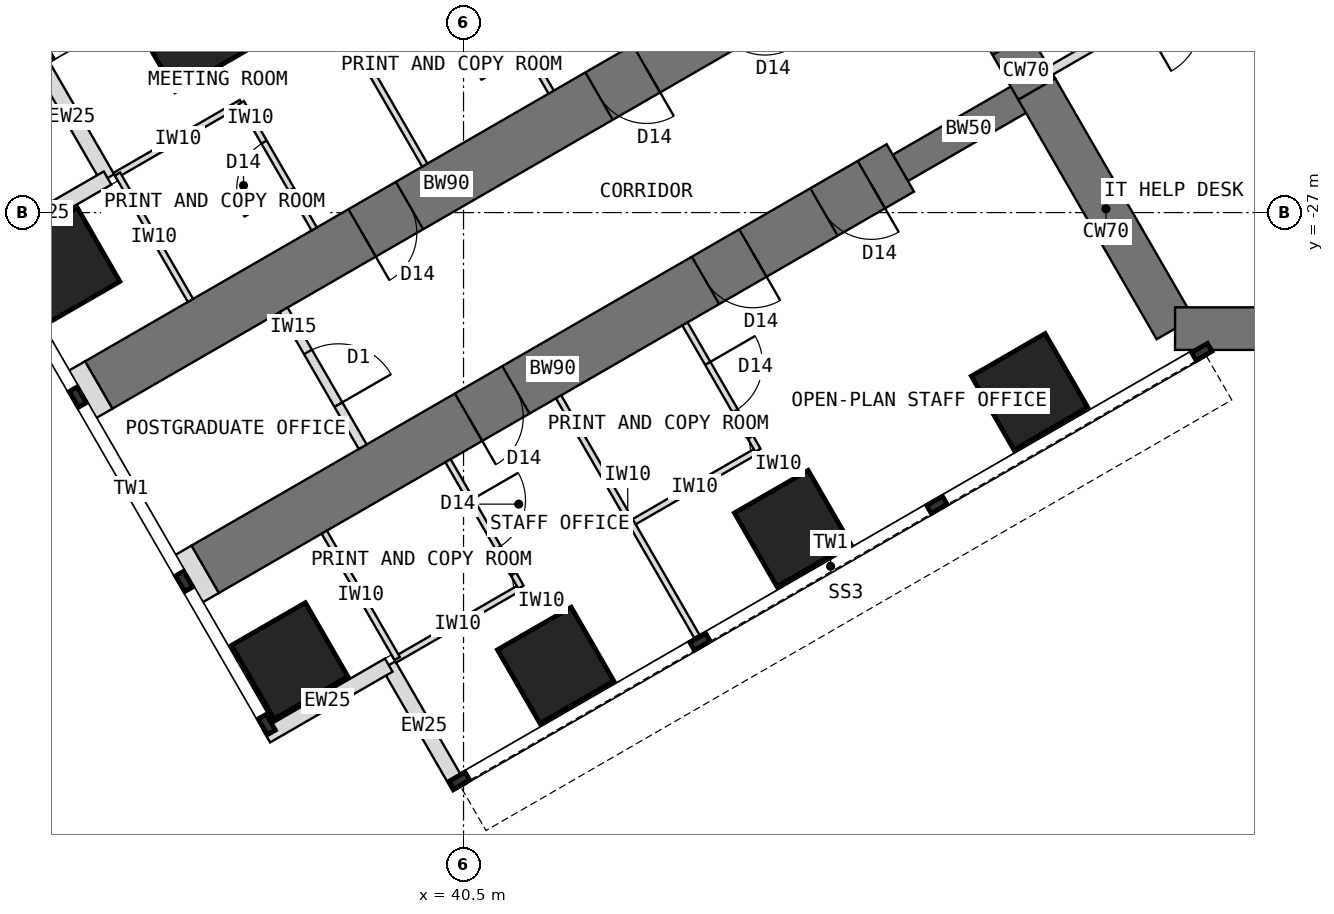
"""IFC4 building model, lengths in metres.
Left out: names, types, materials, properties, quantities, classifications, styles, units other than length and angle.
Written with IfcOpenShell. Run it as: python <this file> out.ifc"""

import sys

from ifc_helpers import new_model, si_unit, direction, frame, frame_2d, origin, origin_2d, place, context, subcontext, project, spatial, rectangle, extrude, element, fill, save


model = new_model("IFC4")
c1 = context("Model", 3, precision=1e-05, world=origin(), true_north=direction((0.0, 1.0)))
c2 = subcontext(c1, "Body", "Model", "MODEL_VIEW")
j1 = project(units=[si_unit("LENGTHUNIT", "METRE"), si_unit("PLANEANGLEUNIT", "RADIAN")], contexts=[c1])
p1 = place(None, origin())
s1 = spatial("IfcSite", under=j1, at=p1, CompositionType="ELEMENT")
p2 = place(p1, origin())
s2 = spatial("IfcBuilding", under=s1, at=p2, CompositionType="ELEMENT")
p3 = place(p2, frame((0.0, 0.0, 72.5)))
s3 = spatial("IfcBuildingStorey", under=s2, at=p3, CompositionType="ELEMENT", Elevation=72.5)
p4 = place(p3, frame((48.178, -21.939, 0.0), z_axis=(0.0, 0.0, 1.0), x_axis=(0.500010275428, -0.866019471182, 0.0)))
e1 = element("IfcWall", 1, at=p4, inside=s3, PredefinedType="SHEAR", context=c2, shape_type="SweptSolid", body=[
    extrude(rectangle(XDim=3.5, YDim=0.7, at=frame_2d((1.75, 0.0))), origin(), (0.0, 0.0, 1.0), 4.0),
])
p5 = place(p4, frame((0.85, 0.0, 0.0)))
e2 = element("IfcOpeningElement", 2, at=p5, cuts=e1, PredefinedType="OPENING", context=c2, shape_type="SweptSolid", body=[
    extrude(rectangle(XDim=1.8, YDim=2.1, at=frame_2d((0.9, 1.05))), frame((0.0, 0.36, 0.0), z_axis=(0.0, -1.0, 0.0), x_axis=(1.0, 0.0, 0.0)), (0.0, 0.0, 1.0), 0.72),
])
p6 = place(p3, frame((49.928, -24.97, 0.0), z_axis=(0.0, 0.0, 1.0), x_axis=(0.499984222037, -0.866034513004, 0.0)))
e3 = element("IfcWall", 3, at=p6, inside=s3, PredefinedType="SHEAR", context=c2, shape_type="SweptSolid", body=[
    extrude(rectangle(XDim=4.548, YDim=0.7, at=frame_2d((2.274, 0.0))), origin(), (0.0, 0.0, 1.0), 4.0),
])
p7 = place(p3, frame((52.202, -28.908, 0.0), z_axis=(0.0, 0.0, 1.0), x_axis=(1.0, 0.0, 0.0)))
e4 = element("IfcWall", 4, at=p7, inside=s3, PredefinedType="SHEAR", context=c2, shape_type="SweptSolid", body=[
    extrude(rectangle(XDim=12.596, YDim=0.7, at=frame_2d((6.298, 0.0))), origin(), (0.0, 0.0, 1.0), 4.0),
])
p8 = place(p3, frame((49.928, -24.97, 0.0), z_axis=(0.0, 0.0, 1.0), x_axis=(-0.866031863473, -0.499988811324, 0.0)))
e5 = element("IfcWall", 5, at=p8, inside=s3, PredefinedType="SHEAR", context=c2, shape_type="SweptSolid", body=[
    extrude(rectangle(XDim=2.592, YDim=0.5, at=frame_2d((1.296, 0.0))), origin(), (0.0, 0.0, 1.0), 4.0),
])
p9 = place(p3, frame((47.684, -26.266, 0.0), z_axis=(0.0, 0.0, 1.0), x_axis=(-0.866027579429, -0.499996231654, 0.0)))
e6 = element("IfcWall", 6, at=p9, inside=s3, PredefinedType="SHEAR", context=c2, shape_type="SweptSolid", body=[
    extrude(rectangle(XDim=13.2, YDim=0.9, at=frame_2d((6.6, 0.0))), origin(), (0.0, 0.0, 1.0), 4.0),
])
p10 = place(p9, frame((0.55, 0.0, 0.0)))
e7 = element("IfcOpeningElement", 7, at=p10, cuts=e6, PredefinedType="OPENING", context=c2, shape_type="SweptSolid", body=[
    extrude(rectangle(XDim=0.9, YDim=2.1, at=frame_2d((0.45, 1.05))), frame((0.0, 0.46, 0.0), z_axis=(0.0, -1.0, 0.0), x_axis=(1.0, 0.0, 0.0)), (0.0, 0.0, 1.0), 0.92),
])
p11 = place(p9, frame((2.8, 0.0, 0.0)))
e8 = element("IfcOpeningElement", 8, at=p11, cuts=e6, PredefinedType="OPENING", context=c2, shape_type="SweptSolid", body=[
    extrude(rectangle(XDim=0.9, YDim=2.1, at=frame_2d((0.45, 1.05))), frame((0.0, 0.46, 0.0), z_axis=(0.0, -1.0, 0.0), x_axis=(1.0, 0.0, 0.0)), (0.0, 0.0, 1.0), 0.92),
])
p12 = place(p9, frame((7.3, 0.0, 0.0)))
e9 = element("IfcOpeningElement", 9, at=p12, cuts=e6, PredefinedType="OPENING", context=c2, shape_type="SweptSolid", body=[
    extrude(rectangle(XDim=0.9, YDim=2.1, at=frame_2d((0.45, 1.05))), frame((0.0, 0.46, 0.0), z_axis=(0.0, -1.0, 0.0), x_axis=(1.0, 0.0, 0.0)), (0.0, 0.0, 1.0), 0.92),
])
p13 = place(p3, frame((45.934, -23.234, 0.0), z_axis=(0.0, 0.0, 1.0), x_axis=(-0.866019570528, -0.500010103361, 0.0)))
e10 = element("IfcWall", 10, at=p13, inside=s3, PredefinedType="SHEAR", context=c2, shape_type="SweptSolid", body=[
    extrude(rectangle(XDim=13.2, YDim=0.9, at=frame_2d((6.6, 0.0))), origin(), (0.0, 0.0, 1.0), 4.0),
])
p14 = place(p13, frame((0.55, 0.0, 0.0)))
e11 = element("IfcOpeningElement", 11, at=p14, cuts=e10, PredefinedType="OPENING", context=c2, shape_type="SweptSolid", body=[
    extrude(rectangle(XDim=0.9, YDim=2.1, at=frame_2d((0.45, 1.05))), frame((0.0, 0.46, 0.0), z_axis=(0.0, -1.0, 0.0), x_axis=(1.0, 0.0, 0.0)), (0.0, 0.0, 1.0), 0.92),
])
p15 = place(p13, frame((2.8, 0.0, 0.0)))
e12 = element("IfcOpeningElement", 12, at=p15, cuts=e10, PredefinedType="OPENING", context=c2, shape_type="SweptSolid", body=[
    extrude(rectangle(XDim=0.9, YDim=2.1, at=frame_2d((0.45, 1.05))), frame((0.0, 0.46, 0.0), z_axis=(0.0, -1.0, 0.0), x_axis=(1.0, 0.0, 0.0)), (0.0, 0.0, 1.0), 0.92),
])
p16 = place(p13, frame((7.3, 0.0, 0.0)))
e13 = element("IfcOpeningElement", 13, at=p16, cuts=e10, PredefinedType="OPENING", context=c2, shape_type="SweptSolid", body=[
    extrude(rectangle(XDim=0.9, YDim=2.1, at=frame_2d((0.45, 1.05))), frame((0.0, 0.46, 0.0), z_axis=(0.0, -1.0, 0.0), x_axis=(1.0, 0.0, 0.0)), (0.0, 0.0, 1.0), 0.92),
])
for number, where, z_axis, x_axis in (
    (14, (49.809, -29.946, 0.0), (0.0, 0.0, 1.0), (0.866, 0.5, 0.0)),
    (15, (45.912, -32.196, 0.0), (0.0, 0.0, 1.0), (0.866, 0.5, 0.0)),
    (16, (42.014, -34.446, 0.0), (0.0, 0.0, 1.0), (0.866, 0.5, 0.0)),
    (17, (36.014, -24.054, 0.0), (0.0, 0.0, 1.0), (0.866, 0.5, 0.0)),
    (18, (37.642, -34.373, 0.0), (0.0, 0.0, 1.0), (0.866, 0.5, 0.0)),
    (19, (33.892, -27.877, 0.0), (0.0, 0.0, 1.0), (0.866, 0.5, 0.0)),
):
    element("IfcColumn", number, at=place(p3, frame(where, z_axis=z_axis, x_axis=x_axis)), inside=s3, PredefinedType="COLUMN", context=c2, shape_type="SweptSolid", body=[
        extrude(rectangle(XDim=1.4, YDim=1.4, at=origin_2d()), origin(), (0.0, 0.0, 1.0), 4.0),
    ])
for number, where, z_axis, x_axis in (
    (20, (40.433, -36.456, 0.0), (0.0, 0.0, 1.0), (-0.5, 0.866, 0.0)),
    (21, (39.27, -34.443, 0.0), (0.0, 0.0, 1.0), (-0.866, -0.5, 0.0)),
    (22, (33.483, -24.419, 0.0), (0.0, 0.0, 1.0), (0.5, -0.866, 0.0)),
    (23, (34.645, -26.432, 0.0), (0.0, 0.0, 1.0), (-0.866, -0.5, 0.0)),
):
    element("IfcWall", number, at=place(p3, frame(where, z_axis=z_axis, x_axis=x_axis)), inside=s3, PredefinedType="STANDARD", context=c2, shape_type="SweptSolid", body=[
        extrude(rectangle(XDim=2.325, YDim=0.25, at=frame_2d((1.163, 0.0))), origin(), (0.0, 0.0, 1.0), 3.8),
    ])
for number, where, z_axis, x_axis in (
    (24, (36.252, -32.865, 0.0), (0.0, 0.0, 1.0), (-0.866, -0.5, 0.0)),
    (25, (34.502, -29.834, 0.0), (0.0, 0.0, 1.0), (-0.866, -0.5, 0.0)),
):
    element("IfcWall", number, at=place(p3, frame(where, z_axis=z_axis, x_axis=x_axis)), inside=s3, PredefinedType="PARTITIONING", context=c2, shape_type="SweptSolid", body=[
        extrude(rectangle(XDim=0.31, YDim=0.9, at=frame_2d((0.155, 0.0))), origin(), (0.0, 0.0, 1.0), 3.8),
    ])
p17 = place(p3, frame((42.063, -30.03, 0.0), z_axis=(0.0, 0.0, 1.0), x_axis=(0.499982560684, -0.866035472144, 0.0)))
e26 = element("IfcWall", 26, at=p17, inside=s3, PredefinedType="PARTITIONING", context=c2, shape_type="SweptSolid", body=[
    extrude(rectangle(XDim=4.55, YDim=0.1, at=frame_2d((2.275, 0.0))), origin(), (0.0, 0.0, 1.0), 3.8),
])
p18 = place(p3, frame((45.342, -30.909, 0.0), z_axis=(0.0, 0.0, 1.0), x_axis=(-0.866050077142, -0.499957262057, 0.0)))
e27 = element("IfcWall", 27, at=p18, inside=s3, PredefinedType="PARTITIONING", context=c2, shape_type="SweptSolid", body=[
    extrude(rectangle(XDim=2.4, YDim=0.1, at=frame_2d((1.2, 0.0))), origin(), (0.0, 0.0, 1.0), 3.8),
])
p19 = place(p3, frame((44.141, -28.83, 0.0), z_axis=(0.0, 0.0, 1.0), x_axis=(0.500077600433, -0.865980596518, 0.0)))
e28 = element("IfcWall", 28, at=p19, inside=s3, PredefinedType="PARTITIONING", context=c2, shape_type="SweptSolid", body=[
    extrude(rectangle(XDim=2.4, YDim=0.1, at=frame_2d((1.2, 0.0))), origin(), (0.0, 0.0, 1.0), 3.8),
])
p20 = place(p19, frame((0.75, 0.0, 0.0)))
e29 = element("IfcOpeningElement", 29, at=p20, cuts=e28, PredefinedType="OPENING", context=c2, shape_type="SweptSolid", body=[
    extrude(rectangle(XDim=0.9, YDim=2.1, at=frame_2d((0.45, 1.05))), frame((0.0, 0.06, 0.0), z_axis=(0.0, -1.0, 0.0), x_axis=(1.0, 0.0, 0.0)), (0.0, 0.0, 1.0), 0.12),
])
p21 = place(p3, frame((41.444, -33.159, 0.0), z_axis=(0.0, 0.0, 1.0), x_axis=(-0.866024647952, -0.500001309137, 0.0)))
e30 = element("IfcWall", 30, at=p21, inside=s3, PredefinedType="PARTITIONING", context=c2, shape_type="SweptSolid", body=[
    extrude(rectangle(XDim=2.4, YDim=0.1, at=frame_2d((1.2, 0.0))), origin(), (0.0, 0.0, 1.0), 3.8),
])
p22 = place(p3, frame((40.244, -31.08, 0.0), z_axis=(0.0, 0.0, 1.0), x_axis=(0.500001309137, -0.866024647952, 0.0)))
e31 = element("IfcWall", 31, at=p22, inside=s3, PredefinedType="PARTITIONING", context=c2, shape_type="SweptSolid", body=[
    extrude(rectangle(XDim=2.4, YDim=0.1, at=frame_2d((1.2, 0.0))), origin(), (0.0, 0.0, 1.0), 3.8),
])
p23 = place(p22, frame((0.75, 0.0, 0.0)))
e32 = element("IfcOpeningElement", 32, at=p23, cuts=e31, PredefinedType="OPENING", context=c2, shape_type="SweptSolid", body=[
    extrude(rectangle(XDim=0.9, YDim=2.1, at=frame_2d((0.45, 1.05))), frame((0.0, 0.06, 0.0), z_axis=(0.0, -1.0, 0.0), x_axis=(1.0, 0.0, 0.0)), (0.0, 0.0, 1.0), 0.12),
])
p24 = place(p3, frame((38.209, -32.255, 0.0), z_axis=(0.0, 0.0, 1.0), x_axis=(0.500001309137, -0.866024647952, 0.0)))
e33 = element("IfcWall", 33, at=p24, inside=s3, PredefinedType="PARTITIONING", context=c2, shape_type="SweptSolid", body=[
    extrude(rectangle(XDim=2.4, YDim=0.1, at=frame_2d((1.2, 0.0))), origin(), (0.0, 0.0, 1.0), 3.8),
])
p25 = place(p3, frame((39.863, -26.22, 0.0), z_axis=(0.0, 0.0, 1.0), x_axis=(-0.500022803284, 0.866012237902, 0.0)))
e34 = element("IfcWall", 34, at=p25, inside=s3, PredefinedType="PARTITIONING", context=c2, shape_type="SweptSolid", body=[
    extrude(rectangle(XDim=4.55, YDim=0.1, at=frame_2d((2.275, 0.0))), origin(), (0.0, 0.0, 1.0), 3.8),
])
p26 = place(p3, frame((41.941, -25.02, 0.0), z_axis=(0.0, 0.0, 1.0), x_axis=(-0.499957262057, 0.866050077142, 0.0)))
e35 = element("IfcWall", 35, at=p26, inside=s3, PredefinedType="PARTITIONING", context=c2, shape_type="SweptSolid", body=[
    extrude(rectangle(XDim=2.4, YDim=0.1, at=frame_2d((1.2, 0.0))), origin(), (0.0, 0.0, 1.0), 3.8),
])
p27 = place(p26, frame((0.75, 0.0, 0.0)))
e36 = element("IfcOpeningElement", 36, at=p27, cuts=e35, PredefinedType="OPENING", context=c2, shape_type="SweptSolid", body=[
    extrude(rectangle(XDim=0.9, YDim=2.1, at=frame_2d((0.45, 1.05))), frame((0.0, 0.06, 0.0), z_axis=(0.0, -1.0, 0.0), x_axis=(1.0, 0.0, 0.0)), (0.0, 0.0, 1.0), 0.12),
])
p28 = place(p3, frame((36.844, -25.191, 0.0), z_axis=(0.0, 0.0, 1.0), x_axis=(-0.865980596518, -0.500077600433, 0.0)))
e37 = element("IfcWall", 37, at=p28, inside=s3, PredefinedType="PARTITIONING", context=c2, shape_type="SweptSolid", body=[
    extrude(rectangle(XDim=2.4, YDim=0.1, at=frame_2d((1.2, 0.0))), origin(), (0.0, 0.0, 1.0), 3.8),
])
p29 = place(p3, frame((38.044, -27.27, 0.0), z_axis=(0.0, 0.0, 1.0), x_axis=(-0.500033551112, 0.866006032174, 0.0)))
e38 = element("IfcWall", 38, at=p29, inside=s3, PredefinedType="PARTITIONING", context=c2, shape_type="SweptSolid", body=[
    extrude(rectangle(XDim=2.4, YDim=0.1, at=frame_2d((1.2, 0.0))), origin(), (0.0, 0.0, 1.0), 3.8),
])
p30 = place(p29, frame((0.75, 0.0, 0.0)))
e39 = element("IfcOpeningElement", 39, at=p30, cuts=e38, PredefinedType="OPENING", context=c2, shape_type="SweptSolid", body=[
    extrude(rectangle(XDim=0.9, YDim=2.1, at=frame_2d((0.45, 1.05))), frame((0.0, 0.06, 0.0), z_axis=(0.0, -1.0, 0.0), x_axis=(1.0, 0.0, 0.0)), (0.0, 0.0, 1.0), 0.12),
])
p31 = place(p3, frame((36.009, -28.445, 0.0), z_axis=(0.0, 0.0, 1.0), x_axis=(-0.500033551112, 0.866006032174, 0.0)))
e40 = element("IfcWall", 40, at=p31, inside=s3, PredefinedType="PARTITIONING", context=c2, shape_type="SweptSolid", body=[
    extrude(rectangle(XDim=2.4, YDim=0.1, at=frame_2d((1.2, 0.0))), origin(), (0.0, 0.0, 1.0), 3.8),
])
p32 = place(p3, frame((54.017, -22.436, 0.0), z_axis=(0.0, 0.0, 1.0), x_axis=(-0.866015446554, -0.500017246033, 0.0)))
e41 = element("IfcWall", 41, at=p32, inside=s3, PredefinedType="PARTITIONING", context=c2, shape_type="SweptSolid", body=[
    extrude(rectangle(XDim=4.469, YDim=0.15, at=frame_2d((2.234, 0.0))), origin(), (0.0, 0.0, 1.0), 3.8),
])
p33 = place(p32, frame((1.744, 0.0, 0.0)))
e42 = element("IfcOpeningElement", 42, at=p33, cuts=e41, PredefinedType="OPENING", context=c2, shape_type="SweptSolid", body=[
    extrude(rectangle(XDim=1.0, YDim=2.1, at=frame_2d((0.5, 1.05))), frame((0.0, 0.085, 0.0), z_axis=(0.0, -1.0, 0.0), x_axis=(1.0, 0.0, 0.0)), (0.0, 0.0, 1.0), 0.17),
])
p34 = place(p3, frame((37.542, -28.599, 0.0), z_axis=(0.0, 0.0, 1.0), x_axis=(0.500006934395, -0.866021400173, 0.0)))
e43 = element("IfcWall", 43, at=p34, inside=s3, PredefinedType="PARTITIONING", context=c2, shape_type="SweptSolid", body=[
    extrude(rectangle(XDim=2.6, YDim=0.15, at=frame_2d((1.3, 0.0))), origin(), (0.0, 0.0, 1.0), 3.8),
])
p35 = place(p34, frame((0.8, 0.0, 0.0)))
e44 = element("IfcOpeningElement", 44, at=p35, cuts=e43, PredefinedType="OPENING", context=c2, shape_type="SweptSolid", body=[
    extrude(rectangle(XDim=1.0, YDim=2.1, at=frame_2d((0.5, 1.05))), frame((0.0, 0.085, 0.0), z_axis=(0.0, -1.0, 0.0), x_axis=(1.0, 0.0, 0.0)), (0.0, 0.0, 1.0), 0.17),
])
p36 = place(p5, origin())
e45 = element("IfcDoor", 45, at=p36, inside=s3, OperationType="DOUBLE_DOOR_DOUBLE_SWING", PredefinedType="DOOR", context=c2, shape_type="SweptSolid", body=[
    extrude(rectangle(XDim=1.72, YDim=2.06, at=frame_2d((0.9, 1.03))), frame((0.0, 0.025, 0.0), z_axis=(0.0, -1.0, 0.0), x_axis=(1.0, 0.0, 0.0)), (0.0, 0.0, 1.0), 0.05),
    extrude(rectangle(XDim=0.04, YDim=2.1, at=frame_2d((0.02, 1.05))), frame((0.0, 0.35, 0.0), z_axis=(0.0, -1.0, 0.0), x_axis=(1.0, 0.0, 0.0)), (0.0, 0.0, 1.0), 0.699),
    extrude(rectangle(XDim=0.04, YDim=2.1, at=frame_2d((1.78, 1.05))), frame((0.0, 0.35, 0.0), z_axis=(0.0, -1.0, 0.0), x_axis=(1.0, 0.0, 0.0)), (0.0, 0.0, 1.0), 0.699),
    extrude(rectangle(XDim=1.72, YDim=0.04, at=frame_2d((0.9, 2.08))), frame((0.0, 0.35, 0.0), z_axis=(0.0, -1.0, 0.0), x_axis=(1.0, 0.0, 0.0)), (0.0, 0.0, 1.0), 0.699),
])
fill(e2, e45)
p37 = place(p20, origin())
e46 = element("IfcDoor", 46, at=p37, inside=s3, OperationType="SINGLE_SWING_LEFT", PredefinedType="DOOR", context=c2, shape_type="SweptSolid", body=[
    extrude(rectangle(XDim=0.9, YDim=2.1, at=frame_2d((0.45, 1.05))), frame((0.0, 0.025, 0.0), z_axis=(0.0, -1.0, 0.0), x_axis=(1.0, 0.0, 0.0)), (0.0, 0.0, 1.0), 0.05),
])
fill(e29, e46)
p38 = place(p23, origin())
e47 = element("IfcDoor", 47, at=p38, inside=s3, OperationType="SINGLE_SWING_LEFT", PredefinedType="DOOR", context=c2, shape_type="SweptSolid", body=[
    extrude(rectangle(XDim=0.9, YDim=2.1, at=frame_2d((0.45, 1.05))), frame((0.0, 0.025, 0.0), z_axis=(0.0, -1.0, 0.0), x_axis=(1.0, 0.0, 0.0)), (0.0, 0.0, 1.0), 0.05),
])
fill(e32, e47)
p39 = place(p27, origin())
e48 = element("IfcDoor", 48, at=p39, inside=s3, OperationType="SINGLE_SWING_LEFT", PredefinedType="DOOR", context=c2, shape_type="SweptSolid", body=[
    extrude(rectangle(XDim=0.9, YDim=2.1, at=frame_2d((0.45, 1.05))), frame((0.0, 0.025, 0.0), z_axis=(0.0, -1.0, 0.0), x_axis=(1.0, 0.0, 0.0)), (0.0, 0.0, 1.0), 0.05),
])
fill(e36, e48)
p40 = place(p30, origin())
e49 = element("IfcDoor", 49, at=p40, inside=s3, OperationType="SINGLE_SWING_LEFT", PredefinedType="DOOR", context=c2, shape_type="SweptSolid", body=[
    extrude(rectangle(XDim=0.9, YDim=2.1, at=frame_2d((0.45, 1.05))), frame((0.0, 0.025, 0.0), z_axis=(0.0, -1.0, 0.0), x_axis=(1.0, 0.0, 0.0)), (0.0, 0.0, 1.0), 0.05),
])
fill(e39, e49)
p41 = place(p35, origin())
e50 = element("IfcDoor", 50, at=p41, inside=s3, OperationType="SINGLE_SWING_RIGHT", PredefinedType="DOOR", context=c2, shape_type="SweptSolid", body=[
    extrude(rectangle(XDim=1.0, YDim=2.1, at=frame_2d((0.5, 1.05))), frame((0.0, 0.025, 0.0), z_axis=(0.0, -1.0, 0.0), x_axis=(1.0, 0.0, 0.0)), (0.0, 0.0, 1.0), 0.05),
])
fill(e44, e50)
p42 = place(p10, origin())
e51 = element("IfcDoor", 51, at=p42, inside=s3, OperationType="SINGLE_SWING_LEFT", PredefinedType="DOOR", context=c2, shape_type="SweptSolid", body=[
    extrude(rectangle(XDim=0.82, YDim=2.06, at=frame_2d((0.45, 1.03))), frame((0.0, 0.025, 0.0), z_axis=(0.0, -1.0, 0.0), x_axis=(1.0, 0.0, 0.0)), (0.0, 0.0, 1.0), 0.05),
    extrude(rectangle(XDim=0.04, YDim=2.1, at=frame_2d((0.02, 1.05))), frame((0.0, 0.45, 0.0), z_axis=(0.0, -1.0, 0.0), x_axis=(1.0, 0.0, 0.0)), (0.0, 0.0, 1.0), 0.899),
    extrude(rectangle(XDim=0.04, YDim=2.1, at=frame_2d((0.88, 1.05))), frame((0.0, 0.45, 0.0), z_axis=(0.0, -1.0, 0.0), x_axis=(1.0, 0.0, 0.0)), (0.0, 0.0, 1.0), 0.899),
    extrude(rectangle(XDim=0.82, YDim=0.04, at=frame_2d((0.45, 2.08))), frame((0.0, 0.45, 0.0), z_axis=(0.0, -1.0, 0.0), x_axis=(1.0, 0.0, 0.0)), (0.0, 0.0, 1.0), 0.899),
])
fill(e7, e51)
p43 = place(p11, origin())
e52 = element("IfcDoor", 52, at=p43, inside=s3, OperationType="SINGLE_SWING_LEFT", PredefinedType="DOOR", context=c2, shape_type="SweptSolid", body=[
    extrude(rectangle(XDim=0.82, YDim=2.06, at=frame_2d((0.45, 1.03))), frame((0.0, 0.025, 0.0), z_axis=(0.0, -1.0, 0.0), x_axis=(1.0, 0.0, 0.0)), (0.0, 0.0, 1.0), 0.05),
    extrude(rectangle(XDim=0.04, YDim=2.1, at=frame_2d((0.02, 1.05))), frame((0.0, 0.45, 0.0), z_axis=(0.0, -1.0, 0.0), x_axis=(1.0, 0.0, 0.0)), (0.0, 0.0, 1.0), 0.899),
    extrude(rectangle(XDim=0.04, YDim=2.1, at=frame_2d((0.88, 1.05))), frame((0.0, 0.45, 0.0), z_axis=(0.0, -1.0, 0.0), x_axis=(1.0, 0.0, 0.0)), (0.0, 0.0, 1.0), 0.899),
    extrude(rectangle(XDim=0.82, YDim=0.04, at=frame_2d((0.45, 2.08))), frame((0.0, 0.45, 0.0), z_axis=(0.0, -1.0, 0.0), x_axis=(1.0, 0.0, 0.0)), (0.0, 0.0, 1.0), 0.899),
])
fill(e8, e52)
p44 = place(p12, origin())
e53 = element("IfcDoor", 53, at=p44, inside=s3, OperationType="SINGLE_SWING_RIGHT", PredefinedType="DOOR", context=c2, shape_type="SweptSolid", body=[
    extrude(rectangle(XDim=0.82, YDim=2.06, at=frame_2d((0.45, 1.03))), frame((0.0, 0.025, 0.0), z_axis=(0.0, -1.0, 0.0), x_axis=(1.0, 0.0, 0.0)), (0.0, 0.0, 1.0), 0.05),
    extrude(rectangle(XDim=0.04, YDim=2.1, at=frame_2d((0.02, 1.05))), frame((0.0, 0.45, 0.0), z_axis=(0.0, -1.0, 0.0), x_axis=(1.0, 0.0, 0.0)), (0.0, 0.0, 1.0), 0.899),
    extrude(rectangle(XDim=0.04, YDim=2.1, at=frame_2d((0.88, 1.05))), frame((0.0, 0.45, 0.0), z_axis=(0.0, -1.0, 0.0), x_axis=(1.0, 0.0, 0.0)), (0.0, 0.0, 1.0), 0.899),
    extrude(rectangle(XDim=0.82, YDim=0.04, at=frame_2d((0.45, 2.08))), frame((0.0, 0.45, 0.0), z_axis=(0.0, -1.0, 0.0), x_axis=(1.0, 0.0, 0.0)), (0.0, 0.0, 1.0), 0.899),
])
fill(e9, e53)
p45 = place(p15, origin())
e54 = element("IfcDoor", 54, at=p45, inside=s3, OperationType="SINGLE_SWING_LEFT", PredefinedType="DOOR", context=c2, shape_type="SweptSolid", body=[
    extrude(rectangle(XDim=0.82, YDim=2.06, at=frame_2d((0.45, 1.03))), frame((0.0, 0.025, 0.0), z_axis=(0.0, -1.0, 0.0), x_axis=(1.0, 0.0, 0.0)), (0.0, 0.0, 1.0), 0.05),
    extrude(rectangle(XDim=0.04, YDim=2.1, at=frame_2d((0.02, 1.05))), frame((0.0, 0.45, 0.0), z_axis=(0.0, -1.0, 0.0), x_axis=(1.0, 0.0, 0.0)), (0.0, 0.0, 1.0), 0.899),
    extrude(rectangle(XDim=0.04, YDim=2.1, at=frame_2d((0.88, 1.05))), frame((0.0, 0.45, 0.0), z_axis=(0.0, -1.0, 0.0), x_axis=(1.0, 0.0, 0.0)), (0.0, 0.0, 1.0), 0.899),
    extrude(rectangle(XDim=0.82, YDim=0.04, at=frame_2d((0.45, 2.08))), frame((0.0, 0.45, 0.0), z_axis=(0.0, -1.0, 0.0), x_axis=(1.0, 0.0, 0.0)), (0.0, 0.0, 1.0), 0.899),
])
fill(e12, e54)
p46 = place(p16, origin())
e55 = element("IfcDoor", 55, at=p46, inside=s3, OperationType="SINGLE_SWING_RIGHT", PredefinedType="DOOR", context=c2, shape_type="SweptSolid", body=[
    extrude(rectangle(XDim=0.82, YDim=2.06, at=frame_2d((0.45, 1.03))), frame((0.0, 0.025, 0.0), z_axis=(0.0, -1.0, 0.0), x_axis=(1.0, 0.0, 0.0)), (0.0, 0.0, 1.0), 0.05),
    extrude(rectangle(XDim=0.04, YDim=2.1, at=frame_2d((0.02, 1.05))), frame((0.0, 0.45, 0.0), z_axis=(0.0, -1.0, 0.0), x_axis=(1.0, 0.0, 0.0)), (0.0, 0.0, 1.0), 0.899),
    extrude(rectangle(XDim=0.04, YDim=2.1, at=frame_2d((0.88, 1.05))), frame((0.0, 0.45, 0.0), z_axis=(0.0, -1.0, 0.0), x_axis=(1.0, 0.0, 0.0)), (0.0, 0.0, 1.0), 0.899),
    extrude(rectangle(XDim=0.82, YDim=0.04, at=frame_2d((0.45, 2.08))), frame((0.0, 0.45, 0.0), z_axis=(0.0, -1.0, 0.0), x_axis=(1.0, 0.0, 0.0)), (0.0, 0.0, 1.0), 0.899),
])
fill(e13, e55)
save(model, sys.argv[1])
